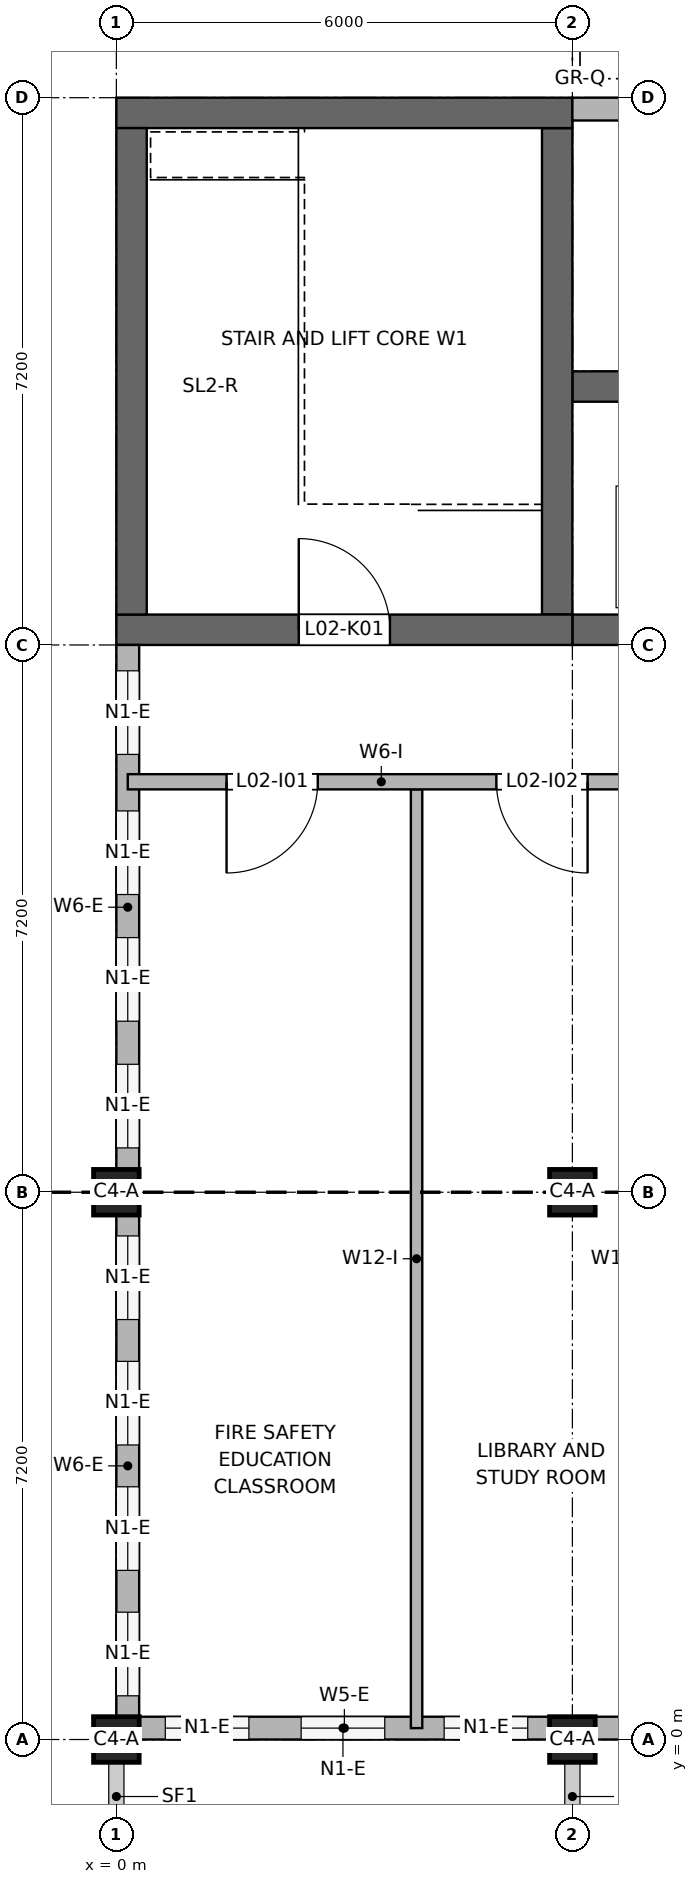
"""IFC4 building model, lengths in metres.
Left out: names, types, materials, properties, quantities, classifications, styles, units other than length and angle.
Written with IfcOpenShell. Run it as: python <this file> out.ifc"""

import sys

from ifc_helpers import new_model, si_unit, direction, frame, frame_2d, origin, origin_2d, place, context, subcontext, project, spatial, rectangle, extrude, element, fill, save


model = new_model("IFC4")
c1 = context("Model", 3, precision=1e-05, world=origin(), true_north=direction((0.0, 1.0)))
c2 = subcontext(c1, "Body", "Model", "MODEL_VIEW")
j1 = project(units=[si_unit("LENGTHUNIT", "METRE"), si_unit("PLANEANGLEUNIT", "RADIAN")], contexts=[c1])
p1 = place(None, origin())
s1 = spatial("IfcSite", under=j1, at=p1, CompositionType="ELEMENT")
p2 = place(p1, origin())
s2 = spatial("IfcBuilding", under=s1, at=p2, CompositionType="ELEMENT")
p3 = place(p2, frame((0.0, 0.0, 8.4)))
s3 = spatial("IfcBuildingStorey", under=s2, at=p3, CompositionType="ELEMENT", Elevation=8.4)
p4 = place(p3, frame((0.0, 14.6, 0.0), z_axis=(0.0, 0.0, 1.0), x_axis=(1.0, 0.0, 0.0)))
e1 = element("IfcWall", 1, at=p4, inside=s3, PredefinedType="SHEAR", context=c2, shape_type="SweptSolid", body=[
    extrude(rectangle(XDim=6.0, YDim=0.4, at=frame_2d((3.0, 0.0))), origin(), (0.0, 0.0, 1.0), 3.95),
])
p5 = place(p4, frame((2.4, 0.0, 0.0)))
e2 = element("IfcOpeningElement", 2, at=p5, cuts=e1, PredefinedType="OPENING", context=c2, shape_type="SweptSolid", body=[
    extrude(rectangle(XDim=1.2, YDim=2.1, at=frame_2d((0.6, 1.05))), frame((0.0, 0.21, 0.0), z_axis=(0.0, -1.0, 0.0), x_axis=(1.0, 0.0, 0.0)), (0.0, 0.0, 1.0), 0.42),
])
p6 = place(p3, frame((0.0, 21.4, 0.0), z_axis=(0.0, 0.0, 1.0), x_axis=(1.0, 0.0, 0.0)))
e3 = element("IfcWall", 3, at=p6, inside=s3, PredefinedType="SHEAR", context=c2, shape_type="SweptSolid", body=[
    extrude(rectangle(XDim=6.0, YDim=0.4, at=frame_2d((3.0, 0.0))), origin(), (0.0, 0.0, 1.0), 3.95),
])
for number, where, z_axis, x_axis in (
    (4, (0.2, 14.8, 0.0), (0.0, 0.0, 1.0), (0.0, 1.0, 0.0)),
    (5, (5.8, 14.8, 0.0), (0.0, 0.0, 1.0), (0.0, 1.0, 0.0)),
):
    element("IfcWall", number, at=place(p3, frame(where, z_axis=z_axis, x_axis=x_axis)), inside=s3, PredefinedType="SHEAR", context=c2, shape_type="SweptSolid", body=[
        extrude(rectangle(XDim=6.4, YDim=0.4, at=frame_2d((3.2, 0.0))), origin(), (0.0, 0.0, 1.0), 3.95),
    ])
p7 = place(p3, frame((6.0, 14.6, 0.0), z_axis=(0.0, 0.0, 1.0), x_axis=(1.0, 0.0, 0.0)))
e6 = element("IfcWall", 6, at=p7, inside=s3, PredefinedType="SHEAR", context=c2, shape_type="SweptSolid", body=[
    extrude(rectangle(XDim=3.0, YDim=0.4, at=frame_2d((1.5, 0.0))), origin(), (0.0, 0.0, 1.0), 5.75),
])
p8 = place(p7, frame((0.95, 0.0, 0.0)))
e7 = element("IfcOpeningElement", 7, at=p8, cuts=e6, PredefinedType="OPENING", context=c2, shape_type="SweptSolid", body=[
    extrude(rectangle(XDim=1.1, YDim=2.1, at=frame_2d((0.55, 1.05))), frame((0.0, 0.21, 0.0), z_axis=(0.0, -1.0, 0.0), x_axis=(1.0, 0.0, 0.0)), (0.0, 0.0, 1.0), 0.42),
])
p9 = place(p3, frame((6.0, 17.8, 0.0), z_axis=(0.0, 0.0, 1.0), x_axis=(1.0, 0.0, 0.0)))
e8 = element("IfcWall", 8, at=p9, inside=s3, PredefinedType="SHEAR", context=c2, shape_type="SweptSolid", body=[
    extrude(rectangle(XDim=3.0, YDim=0.4, at=frame_2d((1.5, 0.0))), origin(), (0.0, 0.0, 1.0), 5.75),
])
for number, where, z_axis, x_axis in (
    (9, (0.0, 0.0, 0.0), (0.0, 0.0, 1.0), (1.0, 0.0, 0.0)),
    (10, (6.0, 0.0, 0.0), (0.0, 0.0, 1.0), (1.0, 0.0, 0.0)),
    (11, (0.0, 7.2, 0.0), (0.0, 0.0, 1.0), (1.0, 0.0, 0.0)),
    (12, (6.0, 7.2, 0.0), (0.0, 0.0, 1.0), (1.0, 0.0, 0.0)),
):
    element("IfcColumn", number, at=place(p3, frame(where, z_axis=z_axis, x_axis=x_axis)), inside=s3, PredefinedType="COLUMN", context=c2, shape_type="SweptSolid", body=[
        extrude(rectangle(XDim=0.6, YDim=0.6, at=origin_2d()), origin(), (0.0, 0.0, 1.0), 3.95),
    ])
p10 = place(p3, frame((0.3, 0.15, 0.0), z_axis=(0.0, 0.0, 1.0), x_axis=(1.0, 0.0, 0.0)))
e13 = element("IfcWall", 13, at=p10, inside=s3, PredefinedType="SOLIDWALL", context=c2, shape_type="SweptSolid", body=[
    extrude(rectangle(XDim=5.4, YDim=0.3, at=frame_2d((2.7, 0.0))), origin(), (0.0, 0.0, 1.0), 3.15),
])
p11 = place(p10, frame((0.344, 0.0, 0.9)))
e14 = element("IfcOpeningElement", 14, at=p11, cuts=e13, PredefinedType="OPENING", context=c2, shape_type="SweptSolid", body=[
    extrude(rectangle(XDim=1.1, YDim=1.5, at=frame_2d((0.55, 0.75))), frame((0.0, 0.16, 0.0), z_axis=(0.0, -1.0, 0.0), x_axis=(1.0, 0.0, 0.0)), (0.0, 0.0, 1.0), 0.32),
])
p12 = place(p10, frame((2.131, 0.0, 0.9)))
e15 = element("IfcOpeningElement", 15, at=p12, cuts=e13, PredefinedType="OPENING", context=c2, shape_type="SweptSolid", body=[
    extrude(rectangle(XDim=1.1, YDim=1.5, at=frame_2d((0.55, 0.75))), frame((0.0, 0.16, 0.0), z_axis=(0.0, -1.0, 0.0), x_axis=(1.0, 0.0, 0.0)), (0.0, 0.0, 1.0), 0.32),
])
p13 = place(p10, frame((4.012, 0.0, 0.9)))
e16 = element("IfcOpeningElement", 16, at=p13, cuts=e13, PredefinedType="OPENING", context=c2, shape_type="SweptSolid", body=[
    extrude(rectangle(XDim=1.1, YDim=1.5, at=frame_2d((0.55, 0.75))), frame((0.0, 0.16, 0.0), z_axis=(0.0, -1.0, 0.0), x_axis=(1.0, 0.0, 0.0)), (0.0, 0.0, 1.0), 0.32),
])
p14 = place(p3, frame((6.3, 0.15, 0.0), z_axis=(0.0, 0.0, 1.0), x_axis=(1.0, 0.0, 0.0)))
e17 = element("IfcWall", 17, at=p14, inside=s3, PredefinedType="SOLIDWALL", context=c2, shape_type="SweptSolid", body=[
    extrude(rectangle(XDim=5.7, YDim=0.3, at=frame_2d((2.85, 0.0))), origin(), (0.0, 0.0, 1.0), 3.15),
])
p15 = place(p14, frame((1.665, 0.0, 0.9)))
e18 = element("IfcOpeningElement", 18, at=p15, cuts=e17, PredefinedType="OPENING", context=c2, shape_type="SweptSolid", body=[
    extrude(rectangle(XDim=1.1, YDim=1.5, at=frame_2d((0.55, 0.75))), frame((0.0, 0.16, 0.0), z_axis=(0.0, -1.0, 0.0), x_axis=(1.0, 0.0, 0.0)), (0.0, 0.0, 1.0), 0.32),
])
p16 = place(p3, frame((0.15, 0.3, 0.0), z_axis=(0.0, 0.0, 1.0), x_axis=(0.0, 1.0, 0.0)))
e19 = element("IfcWall", 19, at=p16, inside=s3, PredefinedType="SOLIDWALL", context=c2, shape_type="SweptSolid", body=[
    extrude(rectangle(XDim=6.6, YDim=0.3, at=frame_2d((3.3, 0.0))), origin(), (0.0, 0.0, 1.0), 3.05),
])
p17 = place(p16, frame((0.275, 0.0, 0.9)))
e20 = element("IfcOpeningElement", 20, at=p17, cuts=e19, PredefinedType="OPENING", context=c2, shape_type="SweptSolid", body=[
    extrude(rectangle(XDim=1.1, YDim=1.5, at=frame_2d((0.55, 0.75))), frame((0.0, 0.16, 0.0), z_axis=(0.0, -1.0, 0.0), x_axis=(1.0, 0.0, 0.0)), (0.0, 0.0, 1.0), 0.32),
])
p18 = place(p16, frame((1.925, 0.0, 0.9)))
e21 = element("IfcOpeningElement", 21, at=p18, cuts=e19, PredefinedType="OPENING", context=c2, shape_type="SweptSolid", body=[
    extrude(rectangle(XDim=1.1, YDim=1.5, at=frame_2d((0.55, 0.75))), frame((0.0, 0.16, 0.0), z_axis=(0.0, -1.0, 0.0), x_axis=(1.0, 0.0, 0.0)), (0.0, 0.0, 1.0), 0.32),
])
p19 = place(p16, frame((3.575, 0.0, 0.9)))
e22 = element("IfcOpeningElement", 22, at=p19, cuts=e19, PredefinedType="OPENING", context=c2, shape_type="SweptSolid", body=[
    extrude(rectangle(XDim=1.1, YDim=1.5, at=frame_2d((0.55, 0.75))), frame((0.0, 0.16, 0.0), z_axis=(0.0, -1.0, 0.0), x_axis=(1.0, 0.0, 0.0)), (0.0, 0.0, 1.0), 0.32),
])
p20 = place(p16, frame((5.225, 0.0, 0.9)))
e23 = element("IfcOpeningElement", 23, at=p20, cuts=e19, PredefinedType="OPENING", context=c2, shape_type="SweptSolid", body=[
    extrude(rectangle(XDim=1.1, YDim=1.5, at=frame_2d((0.55, 0.75))), frame((0.0, 0.16, 0.0), z_axis=(0.0, -1.0, 0.0), x_axis=(1.0, 0.0, 0.0)), (0.0, 0.0, 1.0), 0.32),
])
p21 = place(p3, frame((0.15, 7.5, 0.0), z_axis=(0.0, 0.0, 1.0), x_axis=(0.0, 1.0, 0.0)))
e24 = element("IfcWall", 24, at=p21, inside=s3, PredefinedType="SOLIDWALL", context=c2, shape_type="SweptSolid", body=[
    extrude(rectangle(XDim=6.9, YDim=0.3, at=frame_2d((3.45, 0.0))), origin(), (0.0, 0.0, 1.0), 3.05),
])
p22 = place(p21, frame((0.283, 0.0, 0.9)))
e25 = element("IfcOpeningElement", 25, at=p22, cuts=e24, PredefinedType="OPENING", context=c2, shape_type="SweptSolid", body=[
    extrude(rectangle(XDim=1.1, YDim=1.5, at=frame_2d((0.55, 0.75))), frame((0.0, 0.16, 0.0), z_axis=(0.0, -1.0, 0.0), x_axis=(1.0, 0.0, 0.0)), (0.0, 0.0, 1.0), 0.32),
])
p23 = place(p21, frame((1.95, 0.0, 0.9)))
e26 = element("IfcOpeningElement", 26, at=p23, cuts=e24, PredefinedType="OPENING", context=c2, shape_type="SweptSolid", body=[
    extrude(rectangle(XDim=1.1, YDim=1.5, at=frame_2d((0.55, 0.75))), frame((0.0, 0.16, 0.0), z_axis=(0.0, -1.0, 0.0), x_axis=(1.0, 0.0, 0.0)), (0.0, 0.0, 1.0), 0.32),
])
p24 = place(p21, frame((3.617, 0.0, 0.9)))
e27 = element("IfcOpeningElement", 27, at=p24, cuts=e24, PredefinedType="OPENING", context=c2, shape_type="SweptSolid", body=[
    extrude(rectangle(XDim=1.1, YDim=1.5, at=frame_2d((0.55, 0.75))), frame((0.0, 0.16, 0.0), z_axis=(0.0, -1.0, 0.0), x_axis=(1.0, 0.0, 0.0)), (0.0, 0.0, 1.0), 0.32),
])
p25 = place(p21, frame((5.46, 0.0, 0.9)))
e28 = element("IfcOpeningElement", 28, at=p25, cuts=e24, PredefinedType="OPENING", context=c2, shape_type="SweptSolid", body=[
    extrude(rectangle(XDim=1.1, YDim=1.5, at=frame_2d((0.55, 0.75))), frame((0.0, 0.16, 0.0), z_axis=(0.0, -1.0, 0.0), x_axis=(1.0, 0.0, 0.0)), (0.0, 0.0, 1.0), 0.32),
])
p26 = place(p3, frame((6.0, 21.45, 0.0), z_axis=(0.0, 0.0, 1.0), x_axis=(1.0, 0.0, 0.0)))
e29 = element("IfcWall", 29, at=p26, inside=s3, PredefinedType="SOLIDWALL", context=c2, shape_type="SweptSolid", body=[
    extrude(rectangle(XDim=6.0, YDim=0.3, at=frame_2d((3.0, 0.0))), origin(), (0.0, 0.0, 1.0), 3.95),
])
p27 = place(p26, frame((1.05, 0.0, 0.0)))
e30 = element("IfcOpeningElement", 30, at=p27, cuts=e29, PredefinedType="OPENING", context=c2, shape_type="SweptSolid", body=[
    extrude(rectangle(XDim=1.5, YDim=2.4, at=frame_2d((0.75, 1.2))), frame((0.0, 0.16, 0.0), z_axis=(0.0, -1.0, 0.0), x_axis=(1.0, 0.0, 0.0)), (0.0, 0.0, 1.0), 0.32),
])
p28 = place(p26, frame((2.762, 0.0, 0.9)))
e31 = element("IfcOpeningElement", 31, at=p28, cuts=e29, PredefinedType="OPENING", context=c2, shape_type="SweptSolid", body=[
    extrude(rectangle(XDim=1.1, YDim=1.5, at=frame_2d((0.55, 0.75))), frame((0.0, 0.16, 0.0), z_axis=(0.0, -1.0, 0.0), x_axis=(1.0, 0.0, 0.0)), (0.0, 0.0, 1.0), 0.32),
])
p29 = place(p26, frame((4.087, 0.0, 0.9)))
e32 = element("IfcOpeningElement", 32, at=p29, cuts=e29, PredefinedType="OPENING", context=c2, shape_type="SweptSolid", body=[
    extrude(rectangle(XDim=1.1, YDim=1.5, at=frame_2d((0.55, 0.75))), frame((0.0, 0.16, 0.0), z_axis=(0.0, -1.0, 0.0), x_axis=(1.0, 0.0, 0.0)), (0.0, 0.0, 1.0), 0.32),
])
p30 = place(p3, frame((3.95, 0.15, 0.0), z_axis=(0.0, 0.0, 1.0), x_axis=(0.0, 1.0, 0.0)))
e33 = element("IfcWall", 33, at=p30, inside=s3, PredefinedType="PARTITIONING", context=c2, shape_type="SweptSolid", body=[
    extrude(rectangle(XDim=12.35, YDim=0.15, at=frame_2d((6.175, 0.0))), origin(), (0.0, 0.0, 1.0), 3.15),
])
p31 = place(p3, frame((0.15, 12.6, 0.0), z_axis=(0.0, 0.0, 1.0), x_axis=(1.0, 0.0, 0.0)))
e34 = element("IfcWall", 34, at=p31, inside=s3, PredefinedType="PARTITIONING", context=c2, shape_type="SweptSolid", body=[
    extrude(rectangle(XDim=9.53, YDim=0.2, at=frame_2d((4.765, 0.0))), origin(), (0.0, 0.0, 1.0), 3.05),
])
p32 = place(p31, frame((1.3, 0.0, 0.0)))
e35 = element("IfcOpeningElement", 35, at=p32, cuts=e34, PredefinedType="OPENING", context=c2, shape_type="SweptSolid", body=[
    extrude(rectangle(XDim=1.2, YDim=2.1, at=frame_2d((0.6, 1.05))), frame((0.0, 0.11, 0.0), z_axis=(0.0, -1.0, 0.0), x_axis=(1.0, 0.0, 0.0)), (0.0, 0.0, 1.0), 0.22),
])
p33 = place(p31, frame((4.85, 0.0, 0.0)))
e36 = element("IfcOpeningElement", 36, at=p33, cuts=e34, PredefinedType="OPENING", context=c2, shape_type="SweptSolid", body=[
    extrude(rectangle(XDim=1.2, YDim=2.1, at=frame_2d((0.6, 1.05))), frame((0.0, 0.11, 0.0), z_axis=(0.0, -1.0, 0.0), x_axis=(1.0, 0.0, 0.0)), (0.0, 0.0, 1.0), 0.22),
])
p34 = place(p31, frame((7.815, 0.0, 0.0)))
e37 = element("IfcOpeningElement", 37, at=p34, cuts=e34, PredefinedType="OPENING", context=c2, shape_type="SweptSolid", body=[
    extrude(rectangle(XDim=1.0, YDim=2.1, at=frame_2d((0.5, 1.05))), frame((0.0, 0.11, 0.0), z_axis=(0.0, -1.0, 0.0), x_axis=(1.0, 0.0, 0.0)), (0.0, 0.0, 1.0), 0.22),
])
p35 = place(p11, origin())
e38 = element("IfcWindow", 38, at=p35, inside=s3, PartitioningType="SINGLE_PANEL", PredefinedType="WINDOW", context=c2, shape_type="SweptSolid", body=[
    extrude(rectangle(XDim=1.1, YDim=1.5, at=frame_2d((0.55, 0.75))), frame((0.0, 0.03, 0.0), z_axis=(0.0, -1.0, 0.0), x_axis=(1.0, 0.0, 0.0)), (0.0, 0.0, 1.0), 0.06),
])
fill(e14, e38)
p36 = place(p12, origin())
e39 = element("IfcWindow", 39, at=p36, inside=s3, PartitioningType="SINGLE_PANEL", PredefinedType="WINDOW", context=c2, shape_type="SweptSolid", body=[
    extrude(rectangle(XDim=1.1, YDim=1.5, at=frame_2d((0.55, 0.75))), frame((0.0, 0.03, 0.0), z_axis=(0.0, -1.0, 0.0), x_axis=(1.0, 0.0, 0.0)), (0.0, 0.0, 1.0), 0.06),
])
fill(e15, e39)
p37 = place(p13, origin())
e40 = element("IfcWindow", 40, at=p37, inside=s3, PartitioningType="SINGLE_PANEL", PredefinedType="WINDOW", context=c2, shape_type="SweptSolid", body=[
    extrude(rectangle(XDim=1.1, YDim=1.5, at=frame_2d((0.55, 0.75))), frame((0.0, 0.03, 0.0), z_axis=(0.0, -1.0, 0.0), x_axis=(1.0, 0.0, 0.0)), (0.0, 0.0, 1.0), 0.06),
])
fill(e16, e40)
p38 = place(p17, origin())
e41 = element("IfcWindow", 41, at=p38, inside=s3, PartitioningType="SINGLE_PANEL", PredefinedType="WINDOW", context=c2, shape_type="SweptSolid", body=[
    extrude(rectangle(XDim=1.1, YDim=1.5, at=frame_2d((0.55, 0.75))), frame((0.0, 0.03, 0.0), z_axis=(0.0, -1.0, 0.0), x_axis=(1.0, 0.0, 0.0)), (0.0, 0.0, 1.0), 0.06),
])
fill(e20, e41)
p39 = place(p18, origin())
e42 = element("IfcWindow", 42, at=p39, inside=s3, PartitioningType="SINGLE_PANEL", PredefinedType="WINDOW", context=c2, shape_type="SweptSolid", body=[
    extrude(rectangle(XDim=1.1, YDim=1.5, at=frame_2d((0.55, 0.75))), frame((0.0, 0.03, 0.0), z_axis=(0.0, -1.0, 0.0), x_axis=(1.0, 0.0, 0.0)), (0.0, 0.0, 1.0), 0.06),
])
fill(e21, e42)
p40 = place(p19, origin())
e43 = element("IfcWindow", 43, at=p40, inside=s3, PartitioningType="SINGLE_PANEL", PredefinedType="WINDOW", context=c2, shape_type="SweptSolid", body=[
    extrude(rectangle(XDim=1.1, YDim=1.5, at=frame_2d((0.55, 0.75))), frame((0.0, 0.03, 0.0), z_axis=(0.0, -1.0, 0.0), x_axis=(1.0, 0.0, 0.0)), (0.0, 0.0, 1.0), 0.06),
])
fill(e22, e43)
p41 = place(p20, origin())
e44 = element("IfcWindow", 44, at=p41, inside=s3, PartitioningType="SINGLE_PANEL", PredefinedType="WINDOW", context=c2, shape_type="SweptSolid", body=[
    extrude(rectangle(XDim=1.1, YDim=1.5, at=frame_2d((0.55, 0.75))), frame((0.0, 0.03, 0.0), z_axis=(0.0, -1.0, 0.0), x_axis=(1.0, 0.0, 0.0)), (0.0, 0.0, 1.0), 0.06),
])
fill(e23, e44)
p42 = place(p22, origin())
e45 = element("IfcWindow", 45, at=p42, inside=s3, PartitioningType="SINGLE_PANEL", PredefinedType="WINDOW", context=c2, shape_type="SweptSolid", body=[
    extrude(rectangle(XDim=1.1, YDim=1.5, at=frame_2d((0.55, 0.75))), frame((0.0, 0.03, 0.0), z_axis=(0.0, -1.0, 0.0), x_axis=(1.0, 0.0, 0.0)), (0.0, 0.0, 1.0), 0.06),
])
fill(e25, e45)
p43 = place(p23, origin())
e46 = element("IfcWindow", 46, at=p43, inside=s3, PartitioningType="SINGLE_PANEL", PredefinedType="WINDOW", context=c2, shape_type="SweptSolid", body=[
    extrude(rectangle(XDim=1.1, YDim=1.5, at=frame_2d((0.55, 0.75))), frame((0.0, 0.03, 0.0), z_axis=(0.0, -1.0, 0.0), x_axis=(1.0, 0.0, 0.0)), (0.0, 0.0, 1.0), 0.06),
])
fill(e26, e46)
p44 = place(p24, origin())
e47 = element("IfcWindow", 47, at=p44, inside=s3, PartitioningType="SINGLE_PANEL", PredefinedType="WINDOW", context=c2, shape_type="SweptSolid", body=[
    extrude(rectangle(XDim=1.1, YDim=1.5, at=frame_2d((0.55, 0.75))), frame((0.0, 0.03, 0.0), z_axis=(0.0, -1.0, 0.0), x_axis=(1.0, 0.0, 0.0)), (0.0, 0.0, 1.0), 0.06),
])
fill(e27, e47)
p45 = place(p25, origin())
e48 = element("IfcWindow", 48, at=p45, inside=s3, PartitioningType="SINGLE_PANEL", PredefinedType="WINDOW", context=c2, shape_type="SweptSolid", body=[
    extrude(rectangle(XDim=1.1, YDim=1.5, at=frame_2d((0.55, 0.75))), frame((0.0, 0.03, 0.0), z_axis=(0.0, -1.0, 0.0), x_axis=(1.0, 0.0, 0.0)), (0.0, 0.0, 1.0), 0.06),
])
fill(e28, e48)
p46 = place(p5, origin())
e49 = element("IfcDoor", 49, at=p46, inside=s3, OperationType="SINGLE_SWING_LEFT", PredefinedType="DOOR", context=c2, shape_type="SweptSolid", body=[
    extrude(rectangle(XDim=1.2, YDim=2.1, at=frame_2d((0.6, 1.05))), frame((0.0, 0.025, 0.0), z_axis=(0.0, -1.0, 0.0), x_axis=(1.0, 0.0, 0.0)), (0.0, 0.0, 1.0), 0.05),
])
fill(e2, e49)
p47 = place(p32, frame((1.2, 0.0, 0.0), z_axis=(0.0, 0.0, 1.0), x_axis=(-1.0, 0.0, 0.0)))
e50 = element("IfcDoor", 50, at=p47, inside=s3, OperationType="SINGLE_SWING_RIGHT", PredefinedType="DOOR", context=c2, shape_type="SweptSolid", body=[
    extrude(rectangle(XDim=1.2, YDim=2.1, at=frame_2d((0.6, 1.05))), frame((0.0, 0.025, 0.0), z_axis=(0.0, -1.0, 0.0), x_axis=(1.0, 0.0, 0.0)), (0.0, 0.0, 1.0), 0.05),
])
fill(e35, e50)
p48 = place(p33, frame((1.2, 0.0, 0.0), z_axis=(0.0, 0.0, 1.0), x_axis=(-1.0, 0.0, 0.0)))
e51 = element("IfcDoor", 51, at=p48, inside=s3, OperationType="SINGLE_SWING_LEFT", PredefinedType="DOOR", context=c2, shape_type="SweptSolid", body=[
    extrude(rectangle(XDim=1.2, YDim=2.1, at=frame_2d((0.6, 1.05))), frame((0.0, 0.025, 0.0), z_axis=(0.0, -1.0, 0.0), x_axis=(1.0, 0.0, 0.0)), (0.0, 0.0, 1.0), 0.05),
])
fill(e36, e51)
save(model, sys.argv[1])
